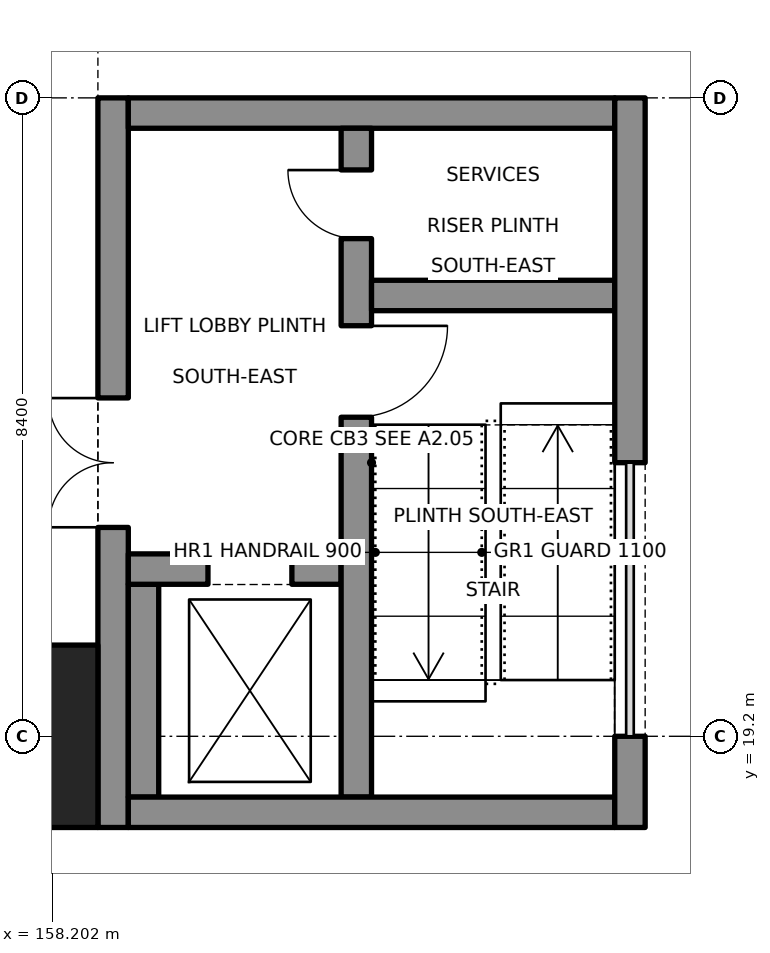
"""IFC4 building model, lengths in metres.
Left out: names, types, materials, properties, quantities, classifications, styles, units other than length and angle.
Written with IfcOpenShell. Run it as: python <this file> out.ifc"""

import sys

from ifc_helpers import new_model, si_unit, direction, frame, frame_2d, origin, origin_2d, place, context, subcontext, project, spatial, rectangle, extrude, element, fill, save


model = new_model("IFC4")
c1 = context("Model", 3, precision=1e-05, world=origin(), true_north=direction((0.0, 1.0)))
c2 = subcontext(c1, "Body", "Model", "MODEL_VIEW")
j1 = project(units=[si_unit("LENGTHUNIT", "METRE"), si_unit("PLANEANGLEUNIT", "RADIAN")], contexts=[c1])
p1 = place(None, origin())
s1 = spatial("IfcSite", under=j1, at=p1, CompositionType="ELEMENT")
p2 = place(p1, origin())
s2 = spatial("IfcBuilding", under=s1, at=p2, CompositionType="ELEMENT")
p3 = place(p2, frame((0.0, 0.0, 4.4)))
s3 = spatial("IfcBuildingStorey", under=s2, at=p3, CompositionType="ELEMENT", Elevation=4.4)
p4 = place(p3, frame((157.6, 19.2, 0.0), z_axis=(0.0, 0.0, 1.0), x_axis=(1.0, 0.0, 0.0)))
e1 = element("IfcColumn", 1, at=p4, inside=s3, PredefinedType="COLUMN", context=c2, shape_type="SweptSolid", body=[
    extrude(rectangle(XDim=2.4, YDim=2.4, at=origin_2d()), origin(), (0.0, 0.0, 1.0), 4.4),
])
p5 = place(p3, frame((165.8, 19.2, 0.0), z_axis=(0.0, 0.0, 1.0), x_axis=(0.0, -1.0, 0.0)))
e2 = element("IfcWall", 2, at=p5, inside=s3, PredefinedType="SHEAR", context=c2, shape_type="SweptSolid", body=[
    extrude(rectangle(XDim=1.2, YDim=0.4, at=frame_2d((0.6, 0.0))), origin(), (0.0, 0.0, 1.0), 4.4),
])
p6 = place(p3, frame((165.8, 27.6, 0.0), z_axis=(0.0, 0.0, 1.0), x_axis=(0.0, -1.0, 0.0)))
e3 = element("IfcWall", 3, at=p6, inside=s3, PredefinedType="SHEAR", context=c2, shape_type="SweptSolid", body=[
    extrude(rectangle(XDim=4.8, YDim=0.4, at=frame_2d((2.4, 0.0))), origin(), (0.0, 0.0, 1.0), 4.4),
])
p7 = place(p3, frame((159.0, 18.0, 0.0), z_axis=(0.0, 0.0, 1.0), x_axis=(0.0, 1.0, 0.0)))
e4 = element("IfcWall", 4, at=p7, inside=s3, PredefinedType="SHEAR", context=c2, shape_type="SweptSolid", body=[
    extrude(rectangle(XDim=9.6, YDim=0.4, at=frame_2d((4.8, 0.0))), origin(), (0.0, 0.0, 1.0), 4.4),
])
p8 = place(p7, frame((3.95, 0.0, 0.0)))
e5 = element("IfcOpeningElement", 5, at=p8, cuts=e4, PredefinedType="OPENING", context=c2, shape_type="SweptSolid", body=[
    extrude(rectangle(XDim=1.7, YDim=2.1, at=frame_2d((0.85, 1.05))), frame((0.0, 0.21, 0.0), z_axis=(0.0, -1.0, 0.0), x_axis=(1.0, 0.0, 0.0)), (0.0, 0.0, 1.0), 0.42),
])
for number, where, z_axis, x_axis in (
    (6, (159.2, 18.2, 0.0), (0.0, 0.0, 1.0), (1.0, 0.0, 0.0)),
    (7, (159.2, 27.4, 0.0), (0.0, 0.0, 1.0), (1.0, 0.0, 0.0)),
):
    element("IfcWall", number, at=place(p3, frame(where, z_axis=z_axis, x_axis=x_axis)), inside=s3, PredefinedType="SHEAR", context=c2, shape_type="SweptSolid", body=[
        extrude(rectangle(XDim=6.4, YDim=0.4, at=frame_2d((3.2, 0.0))), origin(), (0.0, 0.0, 1.0), 4.4),
    ])
p9 = place(p3, frame((162.2, 18.4, 0.0), z_axis=(0.0, 0.0, 1.0), x_axis=(0.0, 1.0, 0.0)))
e8 = element("IfcWall", 8, at=p9, inside=s3, PredefinedType="SHEAR", context=c2, shape_type="SweptSolid", body=[
    extrude(rectangle(XDim=8.8, YDim=0.4, at=frame_2d((4.4, 0.0))), origin(), (0.0, 0.0, 1.0), 4.4),
])
p10 = place(p9, frame((5.0, 0.0, 0.0)))
e9 = element("IfcOpeningElement", 9, at=p10, cuts=e8, PredefinedType="OPENING", context=c2, shape_type="SweptSolid", body=[
    extrude(rectangle(XDim=1.2, YDim=2.1, at=frame_2d((0.6, 1.05))), frame((0.0, 0.21, 0.0), z_axis=(0.0, -1.0, 0.0), x_axis=(1.0, 0.0, 0.0)), (0.0, 0.0, 1.0), 0.42),
])
p11 = place(p9, frame((7.35, 0.0, 0.0)))
e10 = element("IfcOpeningElement", 10, at=p11, cuts=e8, PredefinedType="OPENING", context=c2, shape_type="SweptSolid", body=[
    extrude(rectangle(XDim=0.9, YDim=2.1, at=frame_2d((0.45, 1.05))), frame((0.0, 0.21, 0.0), z_axis=(0.0, -1.0, 0.0), x_axis=(1.0, 0.0, 0.0)), (0.0, 0.0, 1.0), 0.42),
])
p12 = place(p3, frame((162.4, 25.0, 0.0), z_axis=(0.0, 0.0, 1.0), x_axis=(1.0, 0.0, 0.0)))
e11 = element("IfcWall", 11, at=p12, inside=s3, PredefinedType="SHEAR", context=c2, shape_type="SweptSolid", body=[
    extrude(rectangle(XDim=3.2, YDim=0.4, at=frame_2d((1.6, 0.0))), origin(), (0.0, 0.0, 1.0), 4.4),
])
p13 = place(p3, frame((159.2, 21.4, 0.0), z_axis=(0.0, 0.0, 1.0), x_axis=(1.0, 0.0, 0.0)))
e12 = element("IfcWall", 12, at=p13, inside=s3, PredefinedType="SHEAR", context=c2, shape_type="SweptSolid", body=[
    extrude(rectangle(XDim=2.8, YDim=0.4, at=frame_2d((1.4, 0.0))), origin(), (0.0, 0.0, 1.0), 4.4),
])
p14 = place(p13, frame((1.05, 0.0, 0.0)))
e13 = element("IfcOpeningElement", 13, at=p14, cuts=e12, PredefinedType="OPENING", context=c2, shape_type="SweptSolid", body=[
    extrude(rectangle(XDim=1.1, YDim=2.1, at=frame_2d((0.55, 1.05))), frame((0.0, 0.21, 0.0), z_axis=(0.0, -1.0, 0.0), x_axis=(1.0, 0.0, 0.0)), (0.0, 0.0, 1.0), 0.42),
])
p15 = place(p3, frame((159.4, 18.4, 0.0), z_axis=(0.0, 0.0, 1.0), x_axis=(0.0, 1.0, 0.0)))
e14 = element("IfcWall", 14, at=p15, inside=s3, PredefinedType="SHEAR", context=c2, shape_type="SweptSolid", body=[
    extrude(rectangle(XDim=2.8, YDim=0.4, at=frame_2d((1.4, 0.0))), origin(), (0.0, 0.0, 1.0), 4.4),
])
p16 = place(p8, origin())
e15 = element("IfcDoor", 15, at=p16, inside=s3, OperationType="DOUBLE_DOOR_SINGLE_SWING", PredefinedType="DOOR", context=c2, shape_type="SweptSolid", body=[
    extrude(rectangle(XDim=1.7, YDim=2.1, at=frame_2d((0.85, 1.05))), frame((0.0, 0.025, 0.0), z_axis=(0.0, -1.0, 0.0), x_axis=(1.0, 0.0, 0.0)), (0.0, 0.0, 1.0), 0.05),
])
fill(e5, e15)
p17 = place(p10, origin())
e16 = element("IfcDoor", 16, at=p17, inside=s3, OperationType="SINGLE_SWING_RIGHT", PredefinedType="DOOR", context=c2, shape_type="SweptSolid", body=[
    extrude(rectangle(XDim=1.2, YDim=2.1, at=frame_2d((0.6, 1.05))), frame((0.0, 0.025, 0.0), z_axis=(0.0, -1.0, 0.0), x_axis=(1.0, 0.0, 0.0)), (0.0, 0.0, 1.0), 0.05),
])
fill(e9, e16)
p18 = place(p11, origin())
e17 = element("IfcDoor", 17, at=p18, inside=s3, OperationType="SINGLE_SWING_RIGHT", PredefinedType="DOOR", context=c2, shape_type="SweptSolid", body=[
    extrude(rectangle(XDim=0.9, YDim=2.1, at=frame_2d((0.45, 1.05))), frame((0.0, 0.025, 0.0), z_axis=(0.0, -1.0, 0.0), x_axis=(1.0, 0.0, 0.0)), (0.0, 0.0, 1.0), 0.05),
])
fill(e10, e17)
p19 = place(p14, origin())
e18 = element("IfcDoor", 18, at=p19, inside=s3, OperationType="SLIDING_TO_RIGHT", PredefinedType="DOOR", context=c2, shape_type="SweptSolid", body=[
    extrude(rectangle(XDim=1.1, YDim=2.1, at=frame_2d((0.55, 1.05))), frame((0.0, 0.025, 0.0), z_axis=(0.0, -1.0, 0.0), x_axis=(1.0, 0.0, 0.0)), (0.0, 0.0, 1.0), 0.05),
])
fill(e13, e18)
save(model, sys.argv[1])
